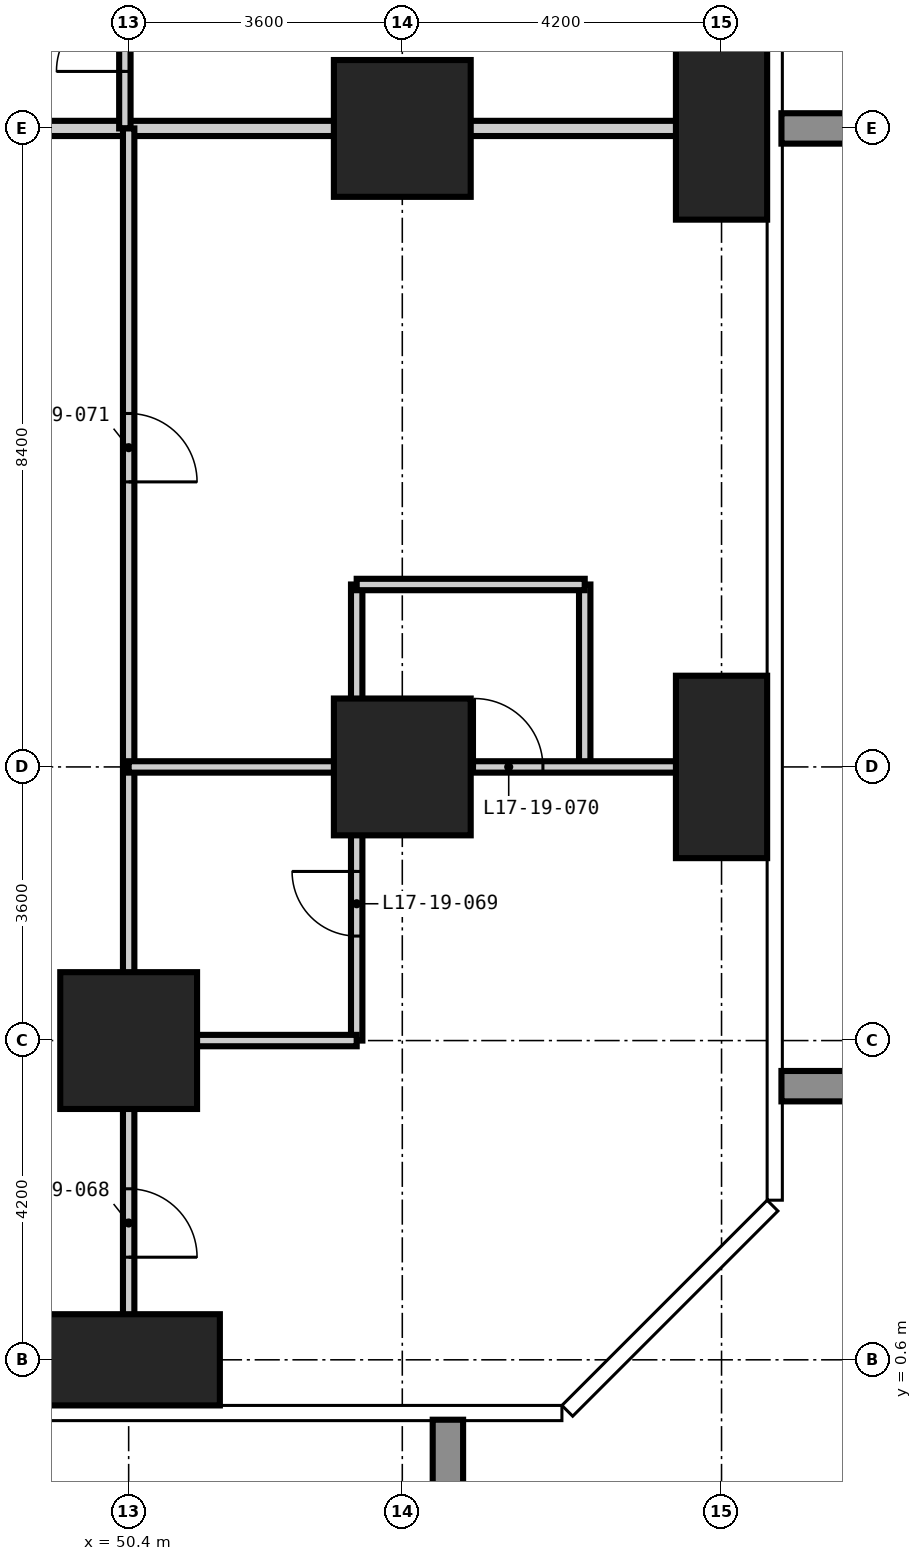
"""IFC4 building model, lengths in metres.
Left out: names, types, materials, properties, quantities, classifications, styles, units other than length and angle.
Written with IfcOpenShell. Run it as: python <this file> out.ifc"""

import sys

from ifc_helpers import new_model, si_unit, direction, frame, frame_2d, origin, origin_2d, place, context, subcontext, project, spatial, rectangle, extrude, element, fill, save


model = new_model("IFC4")
c1 = context("Model", 3, precision=1e-05, world=origin(), true_north=direction((0.0, 1.0)))
c2 = subcontext(c1, "Body", "Model", "MODEL_VIEW")
j1 = project(units=[si_unit("LENGTHUNIT", "METRE"), si_unit("PLANEANGLEUNIT", "RADIAN")], contexts=[c1])
p1 = place(None, origin())
s1 = spatial("IfcSite", under=j1, at=p1, CompositionType="ELEMENT")
p2 = place(p1, origin())
s2 = spatial("IfcBuilding", under=s1, at=p2, CompositionType="ELEMENT")
p3 = place(p2, frame((0.0, 0.0, 70.2)))
s3 = spatial("IfcBuildingStorey", under=s2, at=p3, CompositionType="ELEMENT", Elevation=70.2)
p4 = place(p3, frame((50.4, 0.6, -0.35), z_axis=(0.0, 0.0, 1.0), x_axis=(1.0, 0.0, 0.0)))
e1 = element("IfcColumn", 1, at=p4, inside=s3, PredefinedType="COLUMN", context=c2, shape_type="SweptSolid", body=[
    extrude(rectangle(XDim=2.4, YDim=1.2, at=origin_2d()), origin(), (0.0, 0.0, 1.0), 3.6),
])
for number, where, z_axis, x_axis in (
    (2, (50.4, 4.8, -0.35), (0.0, 0.0, 1.0), (1.0, 0.0, 0.0)),
    (3, (54.0, 8.4, -0.35), (0.0, 0.0, 1.0), (1.0, 0.0, 0.0)),
    (4, (54.0, 16.8, -0.35), (0.0, 0.0, 1.0), (1.0, 0.0, 0.0)),
):
    element("IfcColumn", number, at=place(p3, frame(where, z_axis=z_axis, x_axis=x_axis)), inside=s3, PredefinedType="COLUMN", context=c2, shape_type="SweptSolid", body=[
        extrude(rectangle(XDim=1.8, YDim=1.8, at=origin_2d()), origin(), (0.0, 0.0, 1.0), 3.6),
    ])
for number, where, z_axis, x_axis in (
    (5, (58.2, 8.4, -0.35), (0.0, 0.0, 1.0), (1.0, 0.0, 0.0)),
    (6, (58.2, 16.8, -0.35), (0.0, 0.0, 1.0), (1.0, 0.0, 0.0)),
):
    element("IfcColumn", number, at=place(p3, frame(where, z_axis=z_axis, x_axis=x_axis)), inside=s3, PredefinedType="COLUMN", context=c2, shape_type="SweptSolid", body=[
        extrude(rectangle(XDim=1.2, YDim=2.4, at=origin_2d()), origin(), (0.0, 0.0, 1.0), 3.6),
    ])
p5 = place(p3, frame((53.4, 4.8, 0.0), z_axis=(0.0, 0.0, 1.0), x_axis=(0.0, 1.0, 0.0)))
e7 = element("IfcWall", 7, at=p5, inside=s3, PredefinedType="PARTITIONING", context=c2, shape_type="SweptSolid", body=[
    extrude(rectangle(XDim=3.6, YDim=0.15, at=frame_2d((1.8, 0.0))), origin(), (0.0, 0.0, 1.0), 3.25),
])
p6 = place(p5, frame((1.375, 0.0, 0.0)))
e8 = element("IfcOpeningElement", 8, at=p6, cuts=e7, PredefinedType="OPENING", context=c2, shape_type="SweptSolid", body=[
    extrude(rectangle(XDim=0.85, YDim=2.1, at=frame_2d((0.425, 1.05))), frame((0.0, 0.085, 0.0), z_axis=(0.0, -1.0, 0.0), x_axis=(1.0, 0.0, 0.0)), (0.0, 0.0, 1.0), 0.17),
])
p7 = place(p3, frame((50.4, 4.8, 0.0), z_axis=(0.0, 0.0, 1.0), x_axis=(1.0, 0.0, 0.0)))
e9 = element("IfcWall", 9, at=p7, inside=s3, PredefinedType="PARTITIONING", context=c2, shape_type="SweptSolid", body=[
    extrude(rectangle(XDim=3.0, YDim=0.15, at=frame_2d((1.5, 0.0))), origin(), (0.0, 0.0, 1.0), 3.25),
])
p8 = place(p3, frame((44.95, 16.8, 0.0), z_axis=(0.0, 0.0, 1.0), x_axis=(1.0, 0.0, 0.0)))
e10 = element("IfcWall", 10, at=p8, inside=s3, PredefinedType="PARTITIONING", context=c2, shape_type="SweptSolid", body=[
    extrude(rectangle(XDim=5.4, YDim=0.2, at=frame_2d((2.7, 0.0))), origin(), (0.0, 0.0, 1.0), 3.25),
])
p9 = place(p3, frame((50.4, 16.8, 0.0), z_axis=(0.0, 0.0, 1.0), x_axis=(1.0, 0.0, 0.0)))
e11 = element("IfcWall", 11, at=p9, inside=s3, PredefinedType="PARTITIONING", context=c2, shape_type="SweptSolid", body=[
    extrude(rectangle(XDim=8.408, YDim=0.2, at=frame_2d((4.204, 0.0))), origin(), (0.0, 0.0, 1.0), 3.25),
])
p10 = place(p3, frame((50.35, 16.8, 0.0), z_axis=(0.0, 0.0, 1.0), x_axis=(0.0, 1.0, 0.0)))
e12 = element("IfcWall", 12, at=p10, inside=s3, PredefinedType="PARTITIONING", context=c2, shape_type="SweptSolid", body=[
    extrude(rectangle(XDim=2.4, YDim=0.15, at=frame_2d((1.2, 0.0))), origin(), (0.0, 0.0, 1.0), 3.25),
])
p11 = place(p10, frame((0.75, 0.0, 0.0)))
e13 = element("IfcOpeningElement", 13, at=p11, cuts=e12, PredefinedType="OPENING", context=c2, shape_type="SweptSolid", body=[
    extrude(rectangle(XDim=0.9, YDim=2.1, at=frame_2d((0.45, 1.05))), frame((0.0, 0.085, 0.0), z_axis=(0.0, -1.0, 0.0), x_axis=(1.0, 0.0, 0.0)), (0.0, 0.0, 1.0), 0.17),
])
p12 = place(p3, frame((50.4, -0.008, 0.0), z_axis=(0.0, 0.0, 1.0), x_axis=(0.0, 1.0, 0.0)))
e14 = element("IfcWall", 14, at=p12, inside=s3, PredefinedType="PARTITIONING", context=c2, shape_type="SweptSolid", body=[
    extrude(rectangle(XDim=16.808, YDim=0.15, at=frame_2d((8.404, 0.0))), origin(), (0.0, 0.0, 1.0), 3.25),
])
p13 = place(p12, frame((1.958, 0.0, 0.0)))
e15 = element("IfcOpeningElement", 15, at=p13, cuts=e14, PredefinedType="OPENING", context=c2, shape_type="SweptSolid", body=[
    extrude(rectangle(XDim=0.9, YDim=2.1, at=frame_2d((0.45, 1.05))), frame((0.0, 0.085, 0.0), z_axis=(0.0, -1.0, 0.0), x_axis=(1.0, 0.0, 0.0)), (0.0, 0.0, 1.0), 0.17),
])
p14 = place(p12, frame((12.158, 0.0, 0.0)))
e16 = element("IfcOpeningElement", 16, at=p14, cuts=e14, PredefinedType="OPENING", context=c2, shape_type="SweptSolid", body=[
    extrude(rectangle(XDim=0.9, YDim=2.1, at=frame_2d((0.45, 1.05))), frame((0.0, 0.085, 0.0), z_axis=(0.0, -1.0, 0.0), x_axis=(1.0, 0.0, 0.0)), (0.0, 0.0, 1.0), 0.17),
])
for number, where, z_axis, x_axis in (
    (17, (53.4, 8.4, 0.0), (0.0, 0.0, 1.0), (0.0, 1.0, 0.0)),
    (18, (56.4, 8.4, 0.0), (0.0, 0.0, 1.0), (0.0, 1.0, 0.0)),
):
    element("IfcWall", number, at=place(p3, frame(where, z_axis=z_axis, x_axis=x_axis)), inside=s3, PredefinedType="PARTITIONING", context=c2, shape_type="SweptSolid", body=[
        extrude(rectangle(XDim=2.4, YDim=0.15, at=frame_2d((1.2, 0.0))), origin(), (0.0, 0.0, 1.0), 3.25),
    ])
p15 = place(p3, frame((50.4, 8.4, 0.0), z_axis=(0.0, 0.0, 1.0), x_axis=(1.0, 0.0, 0.0)))
e19 = element("IfcWall", 19, at=p15, inside=s3, PredefinedType="PARTITIONING", context=c2, shape_type="SweptSolid", body=[
    extrude(rectangle(XDim=8.408, YDim=0.15, at=frame_2d((4.204, 0.0))), origin(), (0.0, 0.0, 1.0), 3.25),
])
p16 = place(p15, frame((4.55, 0.0, 0.0)))
e20 = element("IfcOpeningElement", 20, at=p16, cuts=e19, PredefinedType="OPENING", context=c2, shape_type="SweptSolid", body=[
    extrude(rectangle(XDim=0.9, YDim=2.1, at=frame_2d((0.45, 1.05))), frame((0.0, 0.085, 0.0), z_axis=(0.0, -1.0, 0.0), x_axis=(1.0, 0.0, 0.0)), (0.0, 0.0, 1.0), 0.17),
])
p17 = place(p3, frame((53.4, 10.8, 0.0), z_axis=(0.0, 0.0, 1.0), x_axis=(1.0, 0.0, 0.0)))
e21 = element("IfcWall", 21, at=p17, inside=s3, PredefinedType="PARTITIONING", context=c2, shape_type="SweptSolid", body=[
    extrude(rectangle(XDim=3.0, YDim=0.15, at=frame_2d((1.5, 0.0))), origin(), (0.0, 0.0, 1.0), 3.25),
])
p18 = place(p11, origin())
e22 = element("IfcDoor", 22, at=p18, inside=s3, OperationType="SINGLE_SWING_LEFT", PredefinedType="DOOR", context=c2, shape_type="SweptSolid", body=[
    extrude(rectangle(XDim=0.9, YDim=2.1, at=frame_2d((0.45, 1.05))), frame((0.0, 0.025, 0.0), z_axis=(0.0, -1.0, 0.0), x_axis=(1.0, 0.0, 0.0)), (0.0, 0.0, 1.0), 0.05),
])
fill(e13, e22)
p19 = place(p13, frame((0.9, 0.0, 0.0), z_axis=(0.0, 0.0, 1.0), x_axis=(-1.0, 0.0, 0.0)))
e23 = element("IfcDoor", 23, at=p19, inside=s3, OperationType="SINGLE_SWING_RIGHT", PredefinedType="DOOR", context=c2, shape_type="SweptSolid", body=[
    extrude(rectangle(XDim=0.9, YDim=2.1, at=frame_2d((0.45, 1.05))), frame((0.0, 0.025, 0.0), z_axis=(0.0, -1.0, 0.0), x_axis=(1.0, 0.0, 0.0)), (0.0, 0.0, 1.0), 0.05),
])
fill(e15, e23)
p20 = place(p6, origin())
e24 = element("IfcDoor", 24, at=p20, inside=s3, OperationType="SINGLE_SWING_RIGHT", PredefinedType="DOOR", context=c2, shape_type="SweptSolid", body=[
    extrude(rectangle(XDim=0.85, YDim=2.1, at=frame_2d((0.425, 1.05))), frame((0.0, 0.025, 0.0), z_axis=(0.0, -1.0, 0.0), x_axis=(1.0, 0.0, 0.0)), (0.0, 0.0, 1.0), 0.05),
])
fill(e8, e24)
p21 = place(p16, origin())
e25 = element("IfcDoor", 25, at=p21, inside=s3, OperationType="SINGLE_SWING_LEFT", PredefinedType="DOOR", context=c2, shape_type="SweptSolid", body=[
    extrude(rectangle(XDim=0.9, YDim=2.1, at=frame_2d((0.45, 1.05))), frame((0.0, 0.025, 0.0), z_axis=(0.0, -1.0, 0.0), x_axis=(1.0, 0.0, 0.0)), (0.0, 0.0, 1.0), 0.05),
])
fill(e20, e25)
p22 = place(p14, frame((0.9, 0.0, 0.0), z_axis=(0.0, 0.0, 1.0), x_axis=(-1.0, 0.0, 0.0)))
e26 = element("IfcDoor", 26, at=p22, inside=s3, OperationType="SINGLE_SWING_RIGHT", PredefinedType="DOOR", context=c2, shape_type="SweptSolid", body=[
    extrude(rectangle(XDim=0.9, YDim=2.1, at=frame_2d((0.45, 1.05))), frame((0.0, 0.025, 0.0), z_axis=(0.0, -1.0, 0.0), x_axis=(1.0, 0.0, 0.0)), (0.0, 0.0, 1.0), 0.05),
])
fill(e16, e26)
save(model, sys.argv[1])
